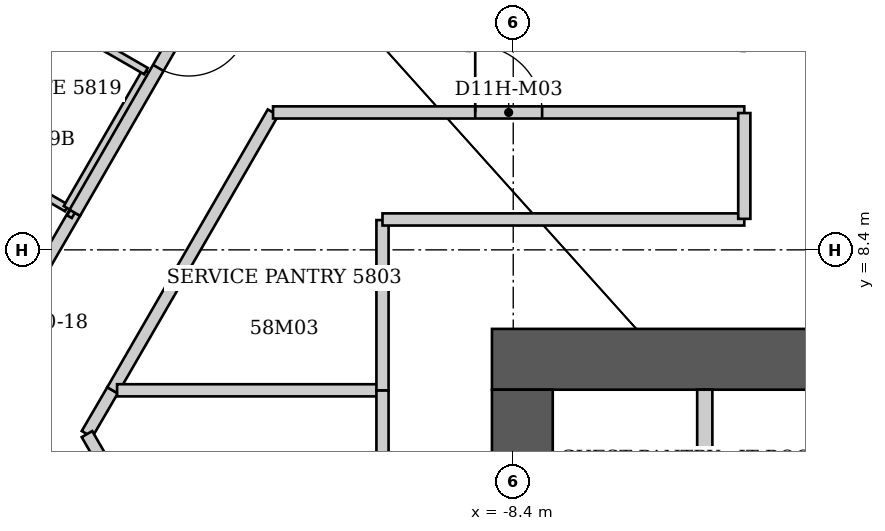
"""IFC4 building model, lengths in metres.
Left out: names, types, materials, properties, quantities, classifications, styles, units other than length and angle.
Written with IfcOpenShell. Run it as: python <this file> out.ifc"""

import sys

from ifc_helpers import new_model, si_unit, direction, frame, frame_2d, origin, place, context, subcontext, project, spatial, rectangle, extrude, element, fill, save


model = new_model("IFC4")
c1 = context("Model", 3, precision=1e-05, world=origin(), true_north=direction((0.0, 1.0)))
c2 = subcontext(c1, "Body", "Model", "MODEL_VIEW")
j1 = project(units=[si_unit("LENGTHUNIT", "METRE"), si_unit("PLANEANGLEUNIT", "RADIAN")], contexts=[c1])
p1 = place(None, origin())
s1 = spatial("IfcSite", under=j1, at=p1, CompositionType="ELEMENT")
p2 = place(p1, origin())
s2 = spatial("IfcBuilding", under=s1, at=p2, CompositionType="ELEMENT")
p3 = place(p2, frame((0.0, 0.0, 232.6)))
s3 = spatial("IfcBuildingStorey", under=s2, at=p3, CompositionType="ELEMENT", Elevation=232.6)
p4 = place(p3, frame((-8.75, 6.6, 0.0), z_axis=(0.0, 0.0, 1.0), x_axis=(1.0, 0.0, 0.0)))
e1 = element("IfcWall", 1, at=p4, inside=s3, PredefinedType="SHEAR", context=c2, shape_type="SweptSolid", body=[
    extrude(rectangle(XDim=17.5, YDim=1.0, at=frame_2d((8.75, 0.0))), origin(), (0.0, 0.0, 1.0), 3.8),
])
p5 = place(p4, frame((6.887, 0.0, 0.0)))
e2 = element("IfcOpeningElement", 2, at=p5, cuts=e1, PredefinedType="OPENING", context=c2, shape_type="SweptSolid", body=[
    extrude(rectangle(XDim=1.1, YDim=2.1, at=frame_2d((0.55, 1.05))), frame((0.0, 0.5, 0.0), z_axis=(0.0, -1.0, 0.0), x_axis=(1.0, 0.0, 0.0)), (0.0, 0.0, 1.0), 1.0),
])
p6 = place(p4, frame((9.512, 0.0, 0.0)))
e3 = element("IfcOpeningElement", 3, at=p6, cuts=e1, PredefinedType="OPENING", context=c2, shape_type="SweptSolid", body=[
    extrude(rectangle(XDim=1.1, YDim=2.1, at=frame_2d((0.55, 1.05))), frame((0.0, 0.5, 0.0), z_axis=(0.0, -1.0, 0.0), x_axis=(1.0, 0.0, 0.0)), (0.0, 0.0, 1.0), 1.0),
])
p7 = place(p4, frame((12.137, 0.0, 0.0)))
e4 = element("IfcOpeningElement", 4, at=p7, cuts=e1, PredefinedType="OPENING", context=c2, shape_type="SweptSolid", body=[
    extrude(rectangle(XDim=1.1, YDim=2.1, at=frame_2d((0.55, 1.05))), frame((0.0, 0.5, 0.0), z_axis=(0.0, -1.0, 0.0), x_axis=(1.0, 0.0, 0.0)), (0.0, 0.0, 1.0), 1.0),
])
p8 = place(p4, frame((14.762, 0.0, 0.0)))
e5 = element("IfcOpeningElement", 5, at=p8, cuts=e1, PredefinedType="OPENING", context=c2, shape_type="SweptSolid", body=[
    extrude(rectangle(XDim=1.1, YDim=2.1, at=frame_2d((0.55, 1.05))), frame((0.0, 0.5, 0.0), z_axis=(0.0, -1.0, 0.0), x_axis=(1.0, 0.0, 0.0)), (0.0, 0.0, 1.0), 1.0),
])
p9 = place(p3, frame((-8.25, -6.1, 0.0), z_axis=(0.0, 0.0, 1.0), x_axis=(0.0, 1.0, 0.0)))
e6 = element("IfcWall", 6, at=p9, inside=s3, PredefinedType="SHEAR", context=c2, shape_type="SweptSolid", body=[
    extrude(rectangle(XDim=12.2, YDim=1.0, at=frame_2d((6.1, 0.0))), origin(), (0.0, 0.0, 1.0), 3.8),
])
p10 = place(p9, frame((7.6, 0.0, 0.0)))
e7 = element("IfcOpeningElement", 7, at=p10, cuts=e6, PredefinedType="OPENING", context=c2, shape_type="SweptSolid", body=[
    extrude(rectangle(XDim=1.2, YDim=2.2, at=frame_2d((0.6, 1.1))), frame((0.0, 0.5, 0.0), z_axis=(0.0, -1.0, 0.0), x_axis=(1.0, 0.0, 0.0)), (0.0, 0.0, 1.0), 1.0),
])
p11 = place(p3, frame((-5.25, 3.35, 0.0), z_axis=(0.0, 0.0, 1.0), x_axis=(0.0, 1.0, 0.0)))
e8 = element("IfcWall", 8, at=p11, inside=s3, PredefinedType="PARTITIONING", context=c2, shape_type="SweptSolid", body=[
    extrude(rectangle(XDim=2.75, YDim=0.25, at=frame_2d((1.375, 0.0))), origin(), (0.0, 0.0, 1.0), 3.8),
])
p12 = place(p3, frame((-17.82, 10.29, 0.0), z_axis=(0.0, 0.0, 1.0), x_axis=(0.86531257009, -0.501232636652, 0.0)))
e9 = element("IfcWall", 9, at=p12, inside=s3, PredefinedType="PARTITIONING", context=c2, shape_type="SweptSolid", body=[
    extrude(rectangle(XDim=2.401, YDim=0.12, at=frame_2d((1.201, 0.0))), origin(), (0.0, 0.0, 1.0), 2.878),
])
p13 = place(p3, frame((-17.72, 5.37, 0.0), z_axis=(0.0, 0.0, 1.0), x_axis=(0.501491408171, 0.865162624904, 0.0)))
e10 = element("IfcWall", 10, at=p13, inside=s3, PredefinedType="PARTITIONING", context=c2, shape_type="SweptSolid", body=[
    extrude(rectangle(XDim=4.207, YDim=0.2, at=frame_2d((2.104, 0.0))), origin(), (0.0, 0.0, 1.0), 3.64),
])
p14 = place(p13, frame((1.604, 0.0, 0.0)))
e11 = element("IfcOpeningElement", 11, at=p14, cuts=e10, PredefinedType="OPENING", context=c2, shape_type="SweptSolid", body=[
    extrude(rectangle(XDim=1.0, YDim=2.13, at=frame_2d((0.5, 1.065))), frame((0.0, 0.1, 0.0), z_axis=(0.0, -1.0, 0.0), x_axis=(1.0, 0.0, 0.0)), (0.0, 0.0, 1.0), 0.2),
])
p15 = place(p3, frame((-15.74, 9.09, 0.0), z_axis=(0.0, 0.0, 1.0), x_axis=(0.500291685314, 0.865856933682, 0.0)))
e12 = element("IfcWall", 12, at=p15, inside=s3, PredefinedType="PARTITIONING", context=c2, shape_type="SweptSolid", body=[
    extrude(rectangle(XDim=2.599, YDim=0.12, at=frame_2d((1.299, 0.0))), origin(), (0.0, 0.0, 1.0), 3.64),
])
p16 = place(p3, frame((-15.686, 9.054, 0.0), z_axis=(0.0, 0.0, 1.0), x_axis=(0.86478894661, -0.502135517387, 0.0)))
e13 = element("IfcWall", 13, at=p16, inside=s3, PredefinedType="PARTITIONING", context=c2, shape_type="SweptSolid", body=[
    extrude(rectangle(XDim=0.087, YDim=0.2, at=frame_2d((0.044, 0.0))), origin(), (0.0, 0.0, 1.0), 3.64),
])
p17 = place(p3, frame((-15.61, 9.01, 0.0), z_axis=(0.0, 0.0, 1.0), x_axis=(0.499301665038, 0.866428212428, 0.0)))
e14 = element("IfcWall", 14, at=p17, inside=s3, PredefinedType="PARTITIONING", context=c2, shape_type="SweptSolid", body=[
    extrude(rectangle(XDim=4.086, YDim=0.2, at=frame_2d((2.043, 0.0))), origin(), (0.0, 0.0, 1.0), 3.64),
])
p18 = place(p17, frame((2.75, 0.0, 0.0)))
e15 = element("IfcOpeningElement", 15, at=p18, cuts=e14, PredefinedType="OPENING", context=c2, shape_type="SweptSolid", body=[
    extrude(rectangle(XDim=1.0, YDim=2.13, at=frame_2d((0.5, 1.065))), frame((0.0, 0.1, 0.0), z_axis=(0.0, -1.0, 0.0), x_axis=(1.0, 0.0, 0.0)), (0.0, 0.0, 1.0), 0.2),
])
p19 = place(p3, frame((-15.41, 5.37, 0.0), z_axis=(0.0, 0.0, 1.0), x_axis=(0.503943891868, 0.863736391412, 0.0)))
e16 = element("IfcWall", 16, at=p19, inside=s3, PredefinedType="PARTITIONING", context=c2, shape_type="SweptSolid", body=[
    extrude(rectangle(XDim=0.833, YDim=0.2, at=frame_2d((0.417, 0.0))), origin(), (0.0, 0.0, 1.0), 3.64),
])
p20 = place(p3, frame((-14.99, 6.09, 0.0), z_axis=(0.0, 0.0, 1.0), x_axis=(0.500213626659, 0.86590203124, 0.0)))
e17 = element("IfcWall", 17, at=p20, inside=s3, PredefinedType="PARTITIONING", context=c2, shape_type="SweptSolid", body=[
    extrude(rectangle(XDim=5.278, YDim=0.2, at=frame_2d((2.639, 0.0))), origin(), (0.0, 0.0, 1.0), 3.64),
])
p21 = place(p3, frame((-14.915, 6.09, 0.0), z_axis=(0.0, 0.0, 1.0), x_axis=(1.0, 0.0, 0.0)))
e18 = element("IfcWall", 18, at=p21, inside=s3, PredefinedType="PARTITIONING", context=c2, shape_type="SweptSolid", body=[
    extrude(rectangle(XDim=4.355, YDim=0.2, at=frame_2d((2.177, 0.0))), origin(), (0.0, 0.0, 1.0), 3.64),
])
p22 = place(p3, frame((-14.44, 11.34, 0.0), z_axis=(0.0, 0.0, 1.0), x_axis=(-0.866202511239, 0.499693115345, 0.0)))
e19 = element("IfcWall", 19, at=p22, inside=s3, PredefinedType="PARTITIONING", context=c2, shape_type="SweptSolid", body=[
    extrude(rectangle(XDim=2.401, YDim=0.12, at=frame_2d((1.201, 0.0))), origin(), (0.0, 0.0, 1.0), 3.64),
])
p23 = place(p3, frame((-13.19, 1.52, 0.0), z_axis=(0.0, 0.0, 1.0), x_axis=(-0.499513190454, 0.866306281036, 0.0)))
e20 = element("IfcWall", 20, at=p23, inside=s3, PredefinedType="PARTITIONING", context=c2, shape_type="SweptSolid", body=[
    extrude(rectangle(XDim=4.444, YDim=0.2, at=frame_2d((2.222, 0.0))), origin(), (0.0, 0.0, 1.0), 3.64),
])
p24 = place(p3, frame((-12.35, 10.66, 0.0), z_axis=(0.0, 0.0, 1.0), x_axis=(1.0, 0.0, 0.0)))
e21 = element("IfcWall", 21, at=p24, inside=s3, PredefinedType="PARTITIONING", context=c2, shape_type="SweptSolid", body=[
    extrude(rectangle(XDim=7.75, YDim=0.2, at=frame_2d((3.875, 0.0))), origin(), (0.0, 0.0, 1.0), 3.64),
])
p25 = place(p24, frame((3.325, 0.0, 0.0)))
e22 = element("IfcOpeningElement", 22, at=p25, cuts=e21, PredefinedType="OPENING", context=c2, shape_type="SweptSolid", body=[
    extrude(rectangle(XDim=1.1, YDim=2.2, at=frame_2d((0.55, 1.1))), frame((0.0, 0.1, 0.0), z_axis=(0.0, -1.0, 0.0), x_axis=(1.0, 0.0, 0.0)), (0.0, 0.0, 1.0), 0.2),
])
p26 = place(p3, frame((-10.55, 6.09, 0.0), z_axis=(0.0, 0.0, 1.0), x_axis=(0.0, -1.0, 0.0)))
e23 = element("IfcWall", 23, at=p26, inside=s3, PredefinedType="PARTITIONING", context=c2, shape_type="SweptSolid", body=[
    extrude(rectangle(XDim=4.57, YDim=0.2, at=frame_2d((2.285, 0.0))), origin(), (0.0, 0.0, 1.0), 3.64),
])
p27 = place(p26, frame((1.735, 0.0, 0.0)))
e24 = element("IfcOpeningElement", 24, at=p27, cuts=e23, PredefinedType="OPENING", context=c2, shape_type="SweptSolid", body=[
    extrude(rectangle(XDim=1.1, YDim=2.2, at=frame_2d((0.55, 1.1))), frame((0.0, 0.1, 0.0), z_axis=(0.0, -1.0, 0.0), x_axis=(1.0, 0.0, 0.0)), (0.0, 0.0, 1.0), 0.2),
])
p28 = place(p3, frame((-10.55, 8.89, 0.0), z_axis=(0.0, 0.0, 1.0), x_axis=(0.0, -1.0, 0.0)))
e25 = element("IfcWall", 25, at=p28, inside=s3, PredefinedType="PARTITIONING", context=c2, shape_type="SweptSolid", body=[
    extrude(rectangle(XDim=2.8, YDim=0.2, at=frame_2d((1.4, 0.0))), origin(), (0.0, 0.0, 1.0), 3.64),
])
p29 = place(p3, frame((-4.6, 8.9, 0.0), z_axis=(0.0, 0.0, 1.0), x_axis=(-1.0, 0.0, 0.0)))
e26 = element("IfcWall", 26, at=p29, inside=s3, PredefinedType="PARTITIONING", context=c2, shape_type="SweptSolid", body=[
    extrude(rectangle(XDim=5.95, YDim=0.2, at=frame_2d((2.975, 0.0))), origin(), (0.0, 0.0, 1.0), 3.64),
])
p30 = place(p3, frame((-4.6, 10.65, 0.0), z_axis=(0.0, 0.0, 1.0), x_axis=(0.0, -1.0, 0.0)))
e27 = element("IfcWall", 27, at=p30, inside=s3, PredefinedType="PARTITIONING", context=c2, shape_type="SweptSolid", body=[
    extrude(rectangle(XDim=1.74, YDim=0.2, at=frame_2d((0.87, 0.0))), origin(), (0.0, 0.0, 1.0), 3.64),
])
p31 = place(p18, origin())
e28 = element("IfcDoor", 28, at=p31, inside=s3, OperationType="SINGLE_SWING_RIGHT", PredefinedType="DOOR", context=c2, shape_type="SweptSolid", body=[
    extrude(rectangle(XDim=1.0, YDim=2.13, at=frame_2d((0.5, 1.065))), frame((0.0, 0.025, 0.0), z_axis=(0.0, -1.0, 0.0), x_axis=(1.0, 0.0, 0.0)), (0.0, 0.0, 1.0), 0.05),
])
fill(e15, e28)
p32 = place(p25, origin())
e29 = element("IfcDoor", 29, at=p32, inside=s3, OperationType="SINGLE_SWING_LEFT", PredefinedType="DOOR", context=c2, shape_type="SweptSolid", body=[
    extrude(rectangle(XDim=1.1, YDim=2.2, at=frame_2d((0.55, 1.1))), frame((0.0, 0.025, 0.0), z_axis=(0.0, -1.0, 0.0), x_axis=(1.0, 0.0, 0.0)), (0.0, 0.0, 1.0), 0.05),
])
fill(e22, e29)
save(model, sys.argv[1])
